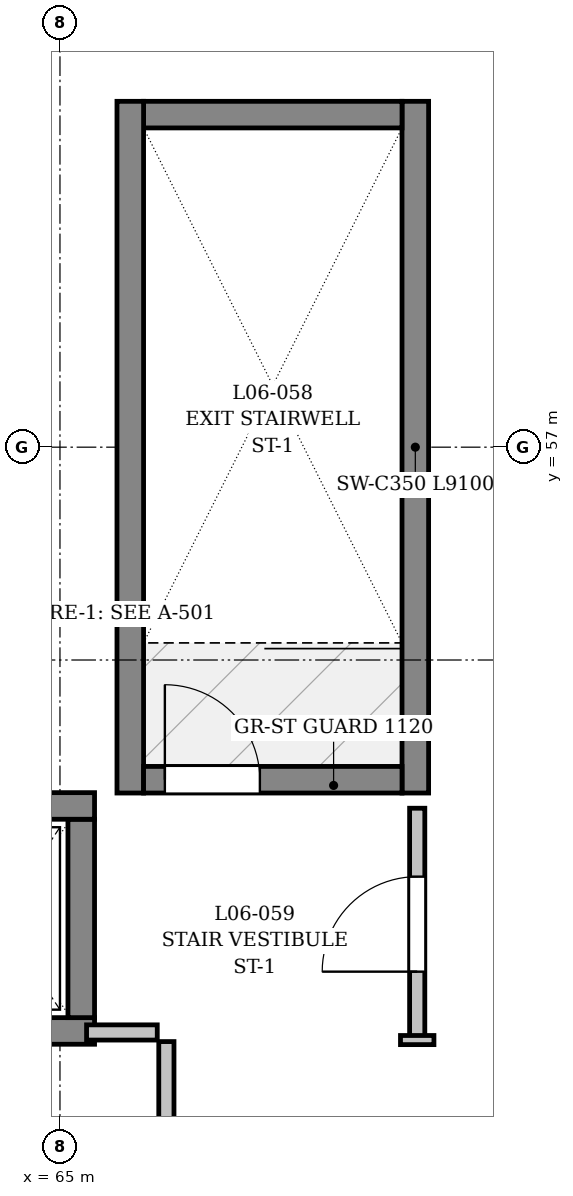
"""IFC4 building model, lengths in metres.
Left out: names, types, materials, properties, quantities, classifications, styles, units other than length and angle.
Written with IfcOpenShell. Run it as: python <this file> out.ifc"""

import sys

from ifc_helpers import new_model, si_unit, direction, frame, frame_2d, origin, place, context, subcontext, project, spatial, rectangle, extrude, element, fill, save


model = new_model("IFC4")
c1 = context("Model", 3, precision=1e-05, world=origin(), true_north=direction((0.0, 1.0)))
c2 = subcontext(c1, "Body", "Model", "MODEL_VIEW")
j1 = project(units=[si_unit("LENGTHUNIT", "METRE"), si_unit("PLANEANGLEUNIT", "RADIAN")], contexts=[c1])
p1 = place(None, origin())
s1 = spatial("IfcSite", under=j1, at=p1, CompositionType="ELEMENT")
p2 = place(p1, origin())
s2 = spatial("IfcBuilding", under=s1, at=p2, CompositionType="ELEMENT")
p3 = place(p2, frame((0.0, 0.0, 24.6)))
s3 = spatial("IfcBuildingStorey", under=s2, at=p3, CompositionType="ELEMENT", Elevation=24.6)
p4 = place(p3, frame((68.634, 44.661, 0.0), z_axis=(0.0, 0.0, 1.0), x_axis=(0.555551818823, 0.83148191598, 0.0)))
e1 = element("IfcWall", 1, at=p4, inside=s3, PredefinedType="SOLIDWALL", context=c2, shape_type="SweptSolid", body=[
    extrude(rectangle(XDim=6.481, YDim=0.32, at=frame_2d((3.241, 0.0))), origin(), (0.0, 0.0, 1.0), 1.19),
])
p5 = place(p3, frame((69.675, 52.45, 0.0), z_axis=(0.0, 0.0, 1.0), x_axis=(0.0, 1.0, 0.0)))
e2 = element("IfcWall", 2, at=p5, inside=s3, PredefinedType="SHEAR", context=c2, shape_type="SweptSolid", body=[
    extrude(rectangle(XDim=9.1, YDim=0.35, at=frame_2d((4.55, 0.0))), origin(), (0.0, 0.0, 1.0), 3.6),
])
p6 = place(p3, frame((69.5, 61.375, 0.0), z_axis=(0.0, 0.0, 1.0), x_axis=(-1.0, 0.0, 0.0)))
e3 = element("IfcWall", 3, at=p6, inside=s3, PredefinedType="SHEAR", context=c2, shape_type="SweptSolid", body=[
    extrude(rectangle(XDim=3.4, YDim=0.35, at=frame_2d((1.7, 0.0))), origin(), (0.0, 0.0, 1.0), 3.6),
])
p7 = place(p3, frame((65.925, 61.55, 0.0), z_axis=(0.0, 0.0, 1.0), x_axis=(0.0, -1.0, 0.0)))
e4 = element("IfcWall", 4, at=p7, inside=s3, PredefinedType="SHEAR", context=c2, shape_type="SweptSolid", body=[
    extrude(rectangle(XDim=9.1, YDim=0.35, at=frame_2d((4.55, 0.0))), origin(), (0.0, 0.0, 1.0), 3.6),
])
p8 = place(p3, frame((66.1, 52.625, 0.0), z_axis=(0.0, 0.0, 1.0), x_axis=(1.0, 0.0, 0.0)))
e5 = element("IfcWall", 5, at=p8, inside=s3, PredefinedType="SHEAR", context=c2, shape_type="SweptSolid", body=[
    extrude(rectangle(XDim=3.4, YDim=0.35, at=frame_2d((1.7, 0.0))), origin(), (0.0, 0.0, 1.0), 3.6),
])
p9 = place(p8, frame((0.28, 0.0, 0.0)))
e6 = element("IfcOpeningElement", 6, at=p9, cuts=e5, PredefinedType="OPENING", context=c2, shape_type="SweptSolid", body=[
    extrude(rectangle(XDim=1.25, YDim=2.2, at=frame_2d((0.625, 1.1))), frame((0.0, 0.185, 0.0), z_axis=(0.0, -1.0, 0.0), x_axis=(1.0, 0.0, 0.0)), (0.0, 0.0, 1.0), 0.37),
])
p10 = place(p3, frame((62.945, 49.32, 0.0), z_axis=(0.0, 0.0, 1.0), x_axis=(1.0, 0.0, 0.0)))
e7 = element("IfcWall", 7, at=p10, inside=s3, PredefinedType="SHEAR", context=c2, shape_type="SweptSolid", body=[
    extrude(rectangle(XDim=2.51, YDim=0.35, at=frame_2d((1.255, 0.0))), origin(), (0.0, 0.0, 1.0), 3.6),
])
p11 = place(p10, frame((0.705, 0.0, 0.0)))
e8 = element("IfcOpeningElement", 8, at=p11, cuts=e7, PredefinedType="OPENING", context=c2, shape_type="SweptSolid", body=[
    extrude(rectangle(XDim=1.1, YDim=2.2, at=frame_2d((0.55, 1.1))), frame((0.0, 0.185, 0.0), z_axis=(0.0, -1.0, 0.0), x_axis=(1.0, 0.0, 0.0)), (0.0, 0.0, 1.0), 0.37),
])
p12 = place(p3, frame((65.28, 49.495, 0.0), z_axis=(0.0, 0.0, 1.0), x_axis=(0.0, 1.0, 0.0)))
e9 = element("IfcWall", 9, at=p12, inside=s3, PredefinedType="SHEAR", context=c2, shape_type="SweptSolid", body=[
    extrude(rectangle(XDim=2.61, YDim=0.35, at=frame_2d((1.305, 0.0))), origin(), (0.0, 0.0, 1.0), 3.6),
])
p13 = place(p3, frame((65.455, 52.28, 0.0), z_axis=(0.0, 0.0, 1.0), x_axis=(-1.0, 0.0, 0.0)))
e10 = element("IfcWall", 10, at=p13, inside=s3, PredefinedType="SHEAR", context=c2, shape_type="SweptSolid", body=[
    extrude(rectangle(XDim=2.51, YDim=0.35, at=frame_2d((1.255, 0.0))), origin(), (0.0, 0.0, 1.0), 3.6),
])
p14 = place(p3, frame((66.4, 46.32, 0.0), z_axis=(0.0, 0.0, 1.0), x_axis=(0.0, 1.0, 0.0)))
e11 = element("IfcWall", 11, at=p14, inside=s3, PredefinedType="PARTITIONING", context=c2, shape_type="SweptSolid", body=[
    extrude(rectangle(XDim=2.86, YDim=0.2, at=frame_2d((1.43, 0.0))), origin(), (0.0, 0.0, 1.0), 4.64),
])
p15 = place(p3, frame((65.35, 49.3, 0.0), z_axis=(0.0, 0.0, 1.0), x_axis=(1.0, 0.0, 0.0)))
e12 = element("IfcWall", 12, at=p15, inside=s3, PredefinedType="PARTITIONING", context=c2, shape_type="SweptSolid", body=[
    extrude(rectangle(XDim=0.93, YDim=0.2, at=frame_2d((0.465, 0.0))), origin(), (0.0, 0.0, 1.0), 4.64),
])
p16 = place(p3, frame((69.7, 49.2, 0.0), z_axis=(0.0, 0.0, 1.0), x_axis=(0.0, 1.0, 0.0)))
e13 = element("IfcWall", 13, at=p16, inside=s3, PredefinedType="PARTITIONING", context=c2, shape_type="SweptSolid", body=[
    extrude(rectangle(XDim=3.05, YDim=0.2, at=frame_2d((1.525, 0.0))), origin(), (0.0, 0.0, 1.0), 3.55),
])
p17 = place(p16, frame((0.9, 0.0, 0.0)))
e14 = element("IfcOpeningElement", 14, at=p17, cuts=e13, PredefinedType="OPENING", context=c2, shape_type="SweptSolid", body=[
    extrude(rectangle(XDim=1.25, YDim=2.2, at=frame_2d((0.625, 1.1))), frame((0.0, 0.11, 0.0), z_axis=(0.0, -1.0, 0.0), x_axis=(1.0, 0.0, 0.0)), (0.0, 0.0, 1.0), 0.22),
])
p18 = place(p3, frame((69.92, 49.2, 0.0), z_axis=(0.0, 0.0, 1.0), x_axis=(-1.0, 0.0, 0.0)))
e15 = element("IfcWall", 15, at=p18, inside=s3, PredefinedType="PARTITIONING", context=c2, shape_type="SweptSolid", body=[
    extrude(rectangle(XDim=0.44, YDim=0.12, at=frame_2d((0.22, 0.0))), origin(), (0.0, 0.0, 1.0), 3.55),
])
p19 = place(p9, origin())
e16 = element("IfcDoor", 16, at=p19, inside=s3, OperationType="SINGLE_SWING_LEFT", PredefinedType="DOOR", context=c2, shape_type="SweptSolid", body=[
    extrude(rectangle(XDim=1.25, YDim=2.2, at=frame_2d((0.625, 1.1))), frame((0.0, 0.025, 0.0), z_axis=(0.0, -1.0, 0.0), x_axis=(1.0, 0.0, 0.0)), (0.0, 0.0, 1.0), 0.05),
])
fill(e6, e16)
p20 = place(p17, origin())
e17 = element("IfcDoor", 17, at=p20, inside=s3, OperationType="SINGLE_SWING_LEFT", PredefinedType="DOOR", context=c2, shape_type="SweptSolid", body=[
    extrude(rectangle(XDim=1.25, YDim=2.2, at=frame_2d((0.625, 1.1))), frame((0.0, 0.025, 0.0), z_axis=(0.0, -1.0, 0.0), x_axis=(1.0, 0.0, 0.0)), (0.0, 0.0, 1.0), 0.05),
])
fill(e14, e17)
save(model, sys.argv[1])
